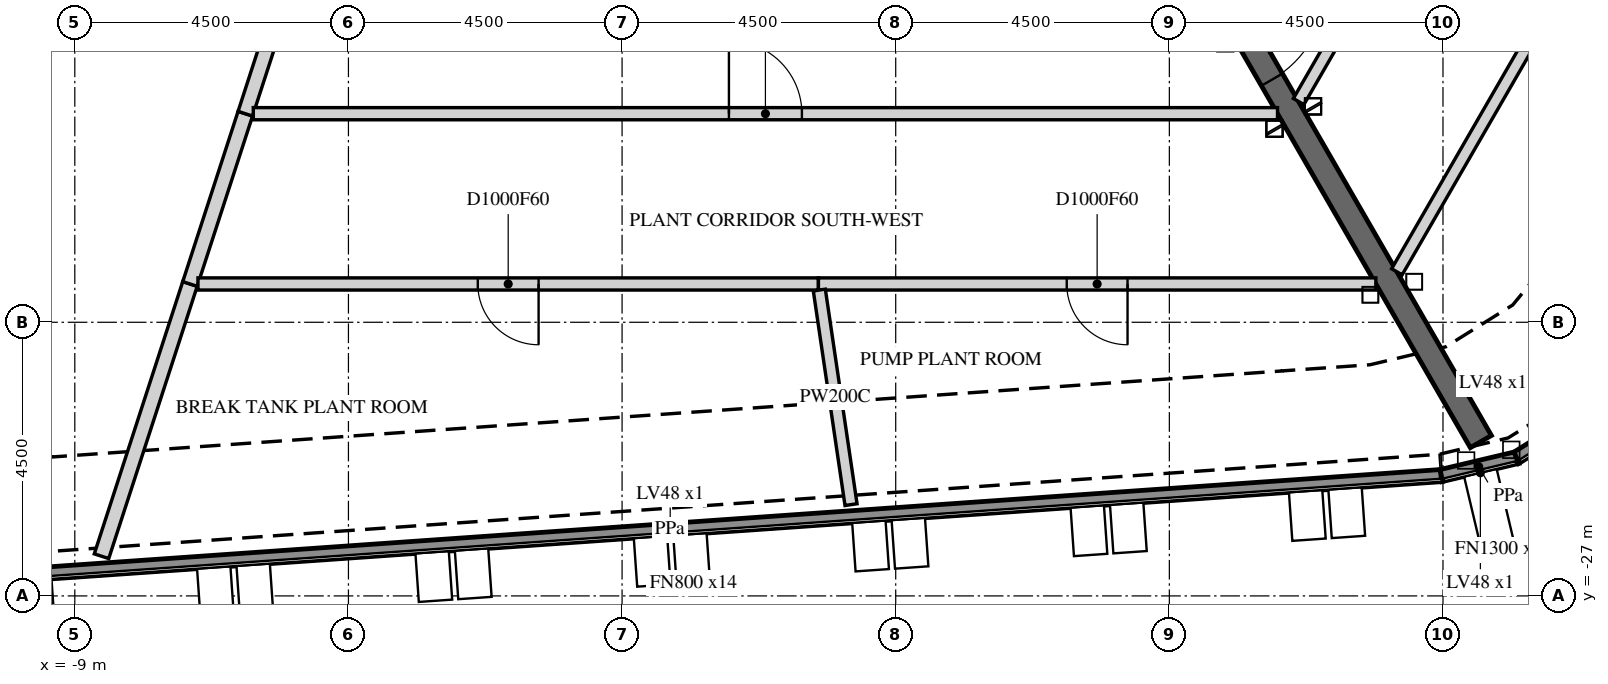
"""IFC4 building model, lengths in metres.
Left out: names, types, materials, properties, quantities, classifications, styles, units other than length and angle.
Written with IfcOpenShell. Run it as: python <this file> out.ifc"""

import sys

from ifc_helpers import new_model, si_unit, direction, frame, frame_2d, origin, place, context, subcontext, project, spatial, polyline, rectangle, outline, extrude, element, fill, save


model = new_model("IFC4")
c1 = context("Model", 3, precision=1e-05, world=origin(), true_north=direction((0.0, 1.0)))
c2 = subcontext(c1, "Body", "Model", "MODEL_VIEW")
j1 = project(units=[si_unit("LENGTHUNIT", "METRE"), si_unit("PLANEANGLEUNIT", "RADIAN")], contexts=[c1])
p1 = place(None, origin())
s1 = spatial("IfcSite", under=j1, at=p1, CompositionType="ELEMENT")
p2 = place(p1, origin())
s2 = spatial("IfcBuilding", under=s1, at=p2, CompositionType="ELEMENT")
p3 = place(p2, frame((0.0, 0.0, 343.5)))
s3 = spatial("IfcBuildingStorey", under=s2, at=p3, CompositionType="ELEMENT", Elevation=343.5)
p4 = place(p3, frame((15.779, -24.058, 5.7), z_axis=(0.0, 0.0, 1.0), x_axis=(-0.847998304005, -0.529998940003, 0.0)))
e1 = element("IfcWall", 1, at=p4, inside=s3, PredefinedType="PARAPET", context=c2, shape_type="SweptSolid", body=[
    extrude(outline(polyline([(0.016, -0.1), (1.248, -0.1), (1.281, 0.1), (-0.016, 0.1), (0.016, -0.1)])), origin(), (0.0, 0.0, 1.0), 1.1),
])
p5 = place(p3, frame((14.706, -24.728, 5.7), z_axis=(0.0, 0.0, 1.0), x_axis=(-0.97305877523, -0.230557194525, 0.0)))
e2 = element("IfcWall", 2, at=p5, inside=s3, PredefinedType="PARAPET", context=c2, shape_type="SweptSolid", body=[
    extrude(outline(polyline([(0.016, -0.1), (1.265, -0.1), (1.281, 0.1), (-0.016, 0.1), (0.016, -0.1)])), origin(), (0.0, 0.0, 1.0), 1.1),
])
p6 = place(p3, frame((13.468, -25.021, 5.7), z_axis=(0.0, 0.0, 1.0), x_axis=(-0.997564174518, -0.069754696747, 0.0)))
e3 = element("IfcWall", 3, at=p6, inside=s3, PredefinedType="PARAPET", context=c2, shape_type="SweptSolid", body=[
    extrude(outline(polyline([(0.008, -0.1), (25.418, -0.1), (25.437, 0.1), (-0.008, 0.1), (0.008, -0.1)])), origin(), (0.0, 0.0, 1.0), 1.1),
])
p7 = place(p3, frame((6.351, -11.0, -0.3), z_axis=(0.0, 0.0, 1.0), x_axis=(0.499998894578, -0.866026041999, 0.0)))
e4 = element("IfcWall", 4, at=p7, inside=s3, PredefinedType="SHEAR", context=c2, shape_type="SweptSolid", body=[
    extrude(rectangle(XDim=15.544, YDim=0.4, at=frame_2d((7.772, 0.0))), origin(), (0.0, 0.0, 1.0), 5.8),
])
p8 = place(p7, frame((6.872, 0.0, 0.3)))
e5 = element("IfcOpeningElement", 5, at=p8, cuts=e4, PredefinedType="OPENING", context=c2, shape_type="SweptSolid", body=[
    extrude(rectangle(XDim=1.8, YDim=2.4, at=frame_2d((0.9, 1.2))), frame((0.0, 0.21, 0.0), z_axis=(0.0, -1.0, 0.0), x_axis=(1.0, 0.0, 0.0)), (0.0, 0.0, 1.0), 0.42),
])
p9 = place(p3, frame((-8.561, -26.347, 0.0), z_axis=(0.0, 0.0, 1.0), x_axis=(0.309046200701, 0.951047026089, 0.0)))
e6 = element("IfcWall", 6, at=p9, inside=s3, PredefinedType="PARTITIONING", context=c2, shape_type="SweptSolid", body=[
    extrude(rectangle(XDim=4.708, YDim=0.25, at=frame_2d((2.354, 0.0))), origin(), (0.0, 0.0, 1.0), 5.5),
])
p10 = place(p3, frame((-7.106, -21.87, 0.0), z_axis=(0.0, 0.0, 1.0), x_axis=(0.309054196713, 0.951044427718, 0.0)))
e7 = element("IfcWall", 7, at=p10, inside=s3, PredefinedType="PARTITIONING", context=c2, shape_type="SweptSolid", body=[
    extrude(rectangle(XDim=2.944, YDim=0.25, at=frame_2d((1.472, 0.0))), origin(), (0.0, 0.0, 1.0), 5.5),
])
p11 = place(p3, frame((3.229, -21.87, 0.0), z_axis=(0.0, 0.0, 1.0), x_axis=(-1.0, 0.0, 0.0)))
e8 = element("IfcWall", 8, at=p11, inside=s3, PredefinedType="PARTITIONING", context=c2, shape_type="SweptSolid", body=[
    extrude(rectangle(XDim=10.204, YDim=0.2, at=frame_2d((5.102, 0.0))), origin(), (0.0, 0.0, 1.0), 5.5),
])
p12 = place(p11, frame((4.602, 0.0, 0.0)))
e9 = element("IfcOpeningElement", 9, at=p12, cuts=e8, PredefinedType="OPENING", context=c2, shape_type="SweptSolid", body=[
    extrude(rectangle(XDim=1.0, YDim=2.1, at=frame_2d((0.5, 1.05))), frame((0.0, 0.11, 0.0), z_axis=(0.0, -1.0, 0.0), x_axis=(1.0, 0.0, 0.0)), (0.0, 0.0, 1.0), 0.22),
])
p13 = place(p3, frame((-6.196, -19.07, 0.0), z_axis=(0.0, 0.0, 1.0), x_axis=(0.309011254429, 0.951058381298, 0.0)))
e10 = element("IfcWall", 10, at=p13, inside=s3, PredefinedType="PARTITIONING", context=c2, shape_type="SweptSolid", body=[
    extrude(rectangle(XDim=8.485, YDim=0.25, at=frame_2d((4.243, 0.0))), origin(), (0.0, 0.0, 1.0), 5.5),
])
p14 = place(p13, frame((3.643, 0.0, 0.0)))
e11 = element("IfcOpeningElement", 11, at=p14, cuts=e10, PredefinedType="OPENING", context=c2, shape_type="SweptSolid", body=[
    extrude(rectangle(XDim=1.2, YDim=2.1, at=frame_2d((0.6, 1.05))), frame((0.0, 0.135, 0.0), z_axis=(0.0, -1.0, 0.0), x_axis=(1.0, 0.0, 0.0)), (0.0, 0.0, 1.0), 0.27),
])
p15 = place(p3, frame((-6.064, -19.07, 0.0), z_axis=(0.0, 0.0, 1.0), x_axis=(1.0, 0.0, 0.0)))
e12 = element("IfcWall", 12, at=p15, inside=s3, PredefinedType="PARTITIONING", context=c2, shape_type="SweptSolid", body=[
    extrude(rectangle(XDim=16.844, YDim=0.2, at=frame_2d((8.422, 0.0))), origin(), (0.0, 0.0, 1.0), 5.5),
])
p16 = place(p15, frame((7.822, 0.0, 0.0)))
e13 = element("IfcOpeningElement", 13, at=p16, cuts=e12, PredefinedType="OPENING", context=c2, shape_type="SweptSolid", body=[
    extrude(rectangle(XDim=1.2, YDim=2.1, at=frame_2d((0.6, 1.05))), frame((0.0, 0.11, 0.0), z_axis=(0.0, -1.0, 0.0), x_axis=(1.0, 0.0, 0.0)), (0.0, 0.0, 1.0), 0.22),
])
p17 = place(p3, frame((12.396, -21.87, 0.0), z_axis=(0.0, 0.0, 1.0), x_axis=(-1.0, 0.0, 0.0)))
e14 = element("IfcWall", 14, at=p17, inside=s3, PredefinedType="PARTITIONING", context=c2, shape_type="SweptSolid", body=[
    extrude(rectangle(XDim=9.167, YDim=0.2, at=frame_2d((4.583, 0.0))), origin(), (0.0, 0.0, 1.0), 5.5),
])
p18 = place(p17, frame((4.083, 0.0, 0.0)))
e15 = element("IfcOpeningElement", 15, at=p18, cuts=e14, PredefinedType="OPENING", context=c2, shape_type="SweptSolid", body=[
    extrude(rectangle(XDim=1.0, YDim=2.1, at=frame_2d((0.5, 1.05))), frame((0.0, 0.11, 0.0), z_axis=(0.0, -1.0, 0.0), x_axis=(1.0, 0.0, 0.0)), (0.0, 0.0, 1.0), 0.22),
])
p19 = place(p3, frame((3.765, -25.499, 0.0), z_axis=(0.0, 0.0, 1.0), x_axis=(-0.146124488578, 0.989266209793, 0.0)))
e16 = element("IfcWall", 16, at=p19, inside=s3, PredefinedType="PARTITIONING", context=c2, shape_type="SweptSolid", body=[
    extrude(rectangle(XDim=3.567, YDim=0.2, at=frame_2d((1.784, 0.0))), origin(), (0.0, 0.0, 1.0), 5.5),
])
p20 = place(p3, frame((11.126, -18.87, 0.0), z_axis=(0.0, 0.0, 1.0), x_axis=(0.499978511878, 0.866037809602, 0.0)))
e17 = element("IfcWall", 17, at=p20, inside=s3, PredefinedType="PARTITIONING", context=c2, shape_type="SweptSolid", body=[
    extrude(rectangle(XDim=21.789, YDim=0.2, at=frame_2d((10.895, 0.0))), origin(), (0.0, 0.0, 1.0), 4.573),
])
p21 = place(p20, frame((10.294, 0.0, 0.0)))
e18 = element("IfcOpeningElement", 18, at=p21, cuts=e17, PredefinedType="OPENING", context=c2, shape_type="SweptSolid", body=[
    extrude(rectangle(XDim=1.2, YDim=2.1, at=frame_2d((0.6, 1.05))), frame((0.0, 0.11, 0.0), z_axis=(0.0, -1.0, 0.0), x_axis=(1.0, 0.0, 0.0)), (0.0, 0.0, 1.0), 0.22),
])
p22 = place(p3, frame((21.264, -6.909, 0.0), z_axis=(0.0, 0.0, 1.0), x_axis=(-0.499987381101, -0.866032689187, 0.0)))
e19 = element("IfcWall", 19, at=p22, inside=s3, PredefinedType="PARTITIONING", context=c2, shape_type="SweptSolid", body=[
    extrude(rectangle(XDim=17.044, YDim=0.2, at=frame_2d((8.522, 0.0))), origin(), (0.0, 0.0, 1.0), 4.573),
])
p23 = place(p22, frame((8.022, 0.0, 0.0)))
e20 = element("IfcOpeningElement", 20, at=p23, cuts=e19, PredefinedType="OPENING", context=c2, shape_type="SweptSolid", body=[
    extrude(rectangle(XDim=1.0, YDim=2.1, at=frame_2d((0.5, 1.05))), frame((0.0, 0.11, 0.0), z_axis=(0.0, -1.0, 0.0), x_axis=(1.0, 0.0, 0.0)), (0.0, 0.0, 1.0), 0.22),
])
p24 = place(p8, origin())
e21 = element("IfcDoor", 21, at=p24, inside=s3, OperationType="DOUBLE_DOOR_SINGLE_SWING", PredefinedType="DOOR", context=c2, shape_type="SweptSolid", body=[
    extrude(rectangle(XDim=1.8, YDim=2.4, at=frame_2d((0.9, 1.2))), frame((0.0, 0.025, 0.0), z_axis=(0.0, -1.0, 0.0), x_axis=(1.0, 0.0, 0.0)), (0.0, 0.0, 1.0), 0.05),
])
fill(e5, e21)
p25 = place(p12, origin())
e22 = element("IfcDoor", 22, at=p25, inside=s3, OperationType="SINGLE_SWING_LEFT", PredefinedType="DOOR", context=c2, shape_type="SweptSolid", body=[
    extrude(rectangle(XDim=1.0, YDim=2.1, at=frame_2d((0.5, 1.05))), frame((0.0, 0.025, 0.0), z_axis=(0.0, -1.0, 0.0), x_axis=(1.0, 0.0, 0.0)), (0.0, 0.0, 1.0), 0.05),
])
fill(e9, e22)
p26 = place(p16, origin())
e23 = element("IfcDoor", 23, at=p26, inside=s3, OperationType="SINGLE_SWING_LEFT", PredefinedType="DOOR", context=c2, shape_type="SweptSolid", body=[
    extrude(rectangle(XDim=1.2, YDim=2.1, at=frame_2d((0.6, 1.05))), frame((0.0, 0.025, 0.0), z_axis=(0.0, -1.0, 0.0), x_axis=(1.0, 0.0, 0.0)), (0.0, 0.0, 1.0), 0.05),
])
fill(e13, e23)
p27 = place(p18, origin())
e24 = element("IfcDoor", 24, at=p27, inside=s3, OperationType="SINGLE_SWING_RIGHT", PredefinedType="DOOR", context=c2, shape_type="SweptSolid", body=[
    extrude(rectangle(XDim=1.0, YDim=2.1, at=frame_2d((0.5, 1.05))), frame((0.0, 0.025, 0.0), z_axis=(0.0, -1.0, 0.0), x_axis=(1.0, 0.0, 0.0)), (0.0, 0.0, 1.0), 0.05),
])
fill(e15, e24)
save(model, sys.argv[1])
